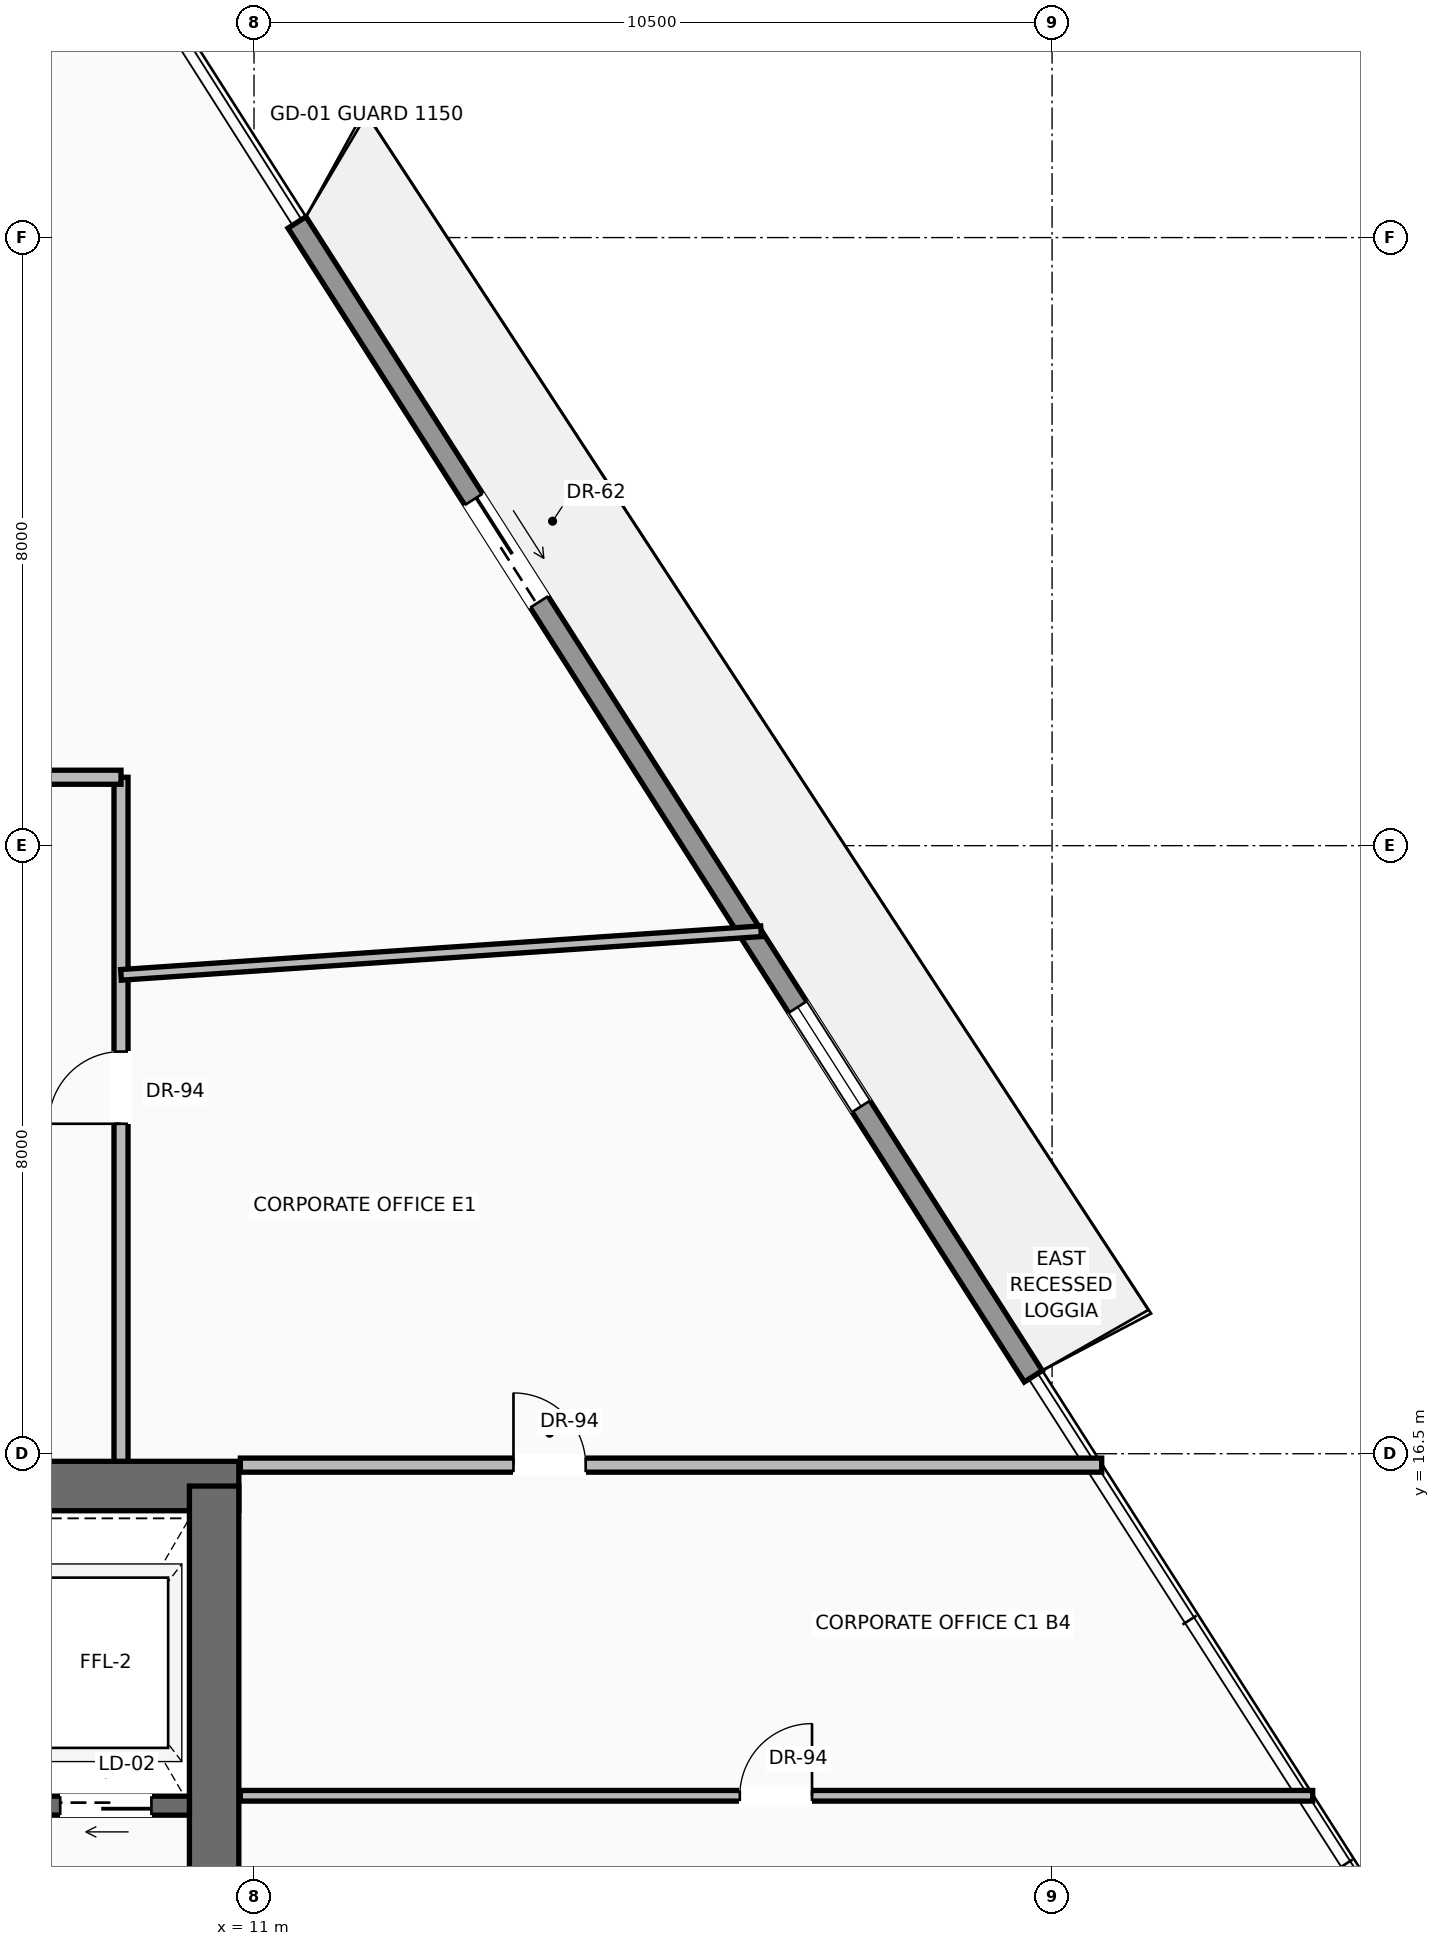
"""IFC4 building model, lengths in metres.
Left out: names, types, materials, properties, quantities, classifications, styles, units other than length and angle.
Written with IfcOpenShell. Run it as: python <this file> out.ifc"""

import sys

from ifc_helpers import new_model, si_unit, direction, frame, frame_2d, origin, place, context, subcontext, project, spatial, rectangle, extrude, source, transform, mapped, element, fill, save


model = new_model("IFC4")
c1 = context("Model", 3, precision=1e-05, world=origin(), true_north=direction((0.0, 1.0)))
c2 = subcontext(c1, "Body", "Model", "MODEL_VIEW")
j1 = project(units=[si_unit("LENGTHUNIT", "METRE"), si_unit("PLANEANGLEUNIT", "RADIAN")], contexts=[c1])
p1 = place(None, origin())
s1 = spatial("IfcSite", under=j1, at=p1, CompositionType="ELEMENT")
p2 = place(p1, origin())
s2 = spatial("IfcBuilding", under=s1, at=p2, CompositionType="ELEMENT")
p3 = place(p2, frame((0.0, 0.0, 133.0)))
s3 = spatial("IfcBuildingStorey", under=s2, at=p3, CompositionType="ELEMENT", Elevation=133.0)
p4 = place(p3, frame((-10.8, 16.075, 0.0), z_axis=(0.0, 0.0, 1.0), x_axis=(1.0, 0.0, 0.0)))
e1 = element("IfcWall", 1, at=p4, inside=s3, PredefinedType="SHEAR", context=c2, shape_type="SweptSolid", body=[
    extrude(rectangle(XDim=21.6, YDim=0.65, at=frame_2d((10.8, 0.0))), origin(), (0.0, 0.0, 1.0), 3.47),
])
p5 = place(p4, frame((3.37, 0.0, 0.0)))
e2 = element("IfcOpeningElement", 2, at=p5, cuts=e1, PredefinedType="OPENING", context=c2, shape_type="SweptSolid", body=[
    extrude(rectangle(XDim=1.3, YDim=2.3, at=frame_2d((0.65, 1.15))), frame((0.0, 0.335, 0.0), z_axis=(0.0, -1.0, 0.0), x_axis=(1.0, 0.0, 0.0)), (0.0, 0.0, 1.0), 0.67),
])
p6 = place(p4, frame((9.8, 0.0, 0.0)))
e3 = element("IfcOpeningElement", 3, at=p6, cuts=e1, PredefinedType="OPENING", context=c2, shape_type="SweptSolid", body=[
    extrude(rectangle(XDim=2.0, YDim=2.4, at=frame_2d((1.0, 1.2))), frame((0.0, 0.335, 0.0), z_axis=(0.0, -1.0, 0.0), x_axis=(1.0, 0.0, 0.0)), (0.0, 0.0, 1.0), 0.67),
])
p7 = place(p3, frame((10.475, 0.525, 0.0), z_axis=(0.0, 0.0, 1.0), x_axis=(0.0, 1.0, 0.0)))
e4 = element("IfcWall", 4, at=p7, inside=s3, PredefinedType="SHEAR", context=c2, shape_type="SweptSolid", body=[
    extrude(rectangle(XDim=15.55, YDim=0.65, at=frame_2d((7.775, 0.0))), origin(), (0.0, 0.0, 1.0), 3.47),
])
p8 = place(p3, frame((11.566, 32.699, 0.0), z_axis=(0.0, 0.0, 1.0), x_axis=(0.537954082698, -0.842974142491, 0.0)))
e5 = element("IfcWall", 5, at=p8, inside=s3, PredefinedType="SOLIDWALL", context=c2, shape_type="SweptSolid", body=[
    extrude(rectangle(XDim=18.008, YDim=0.28, at=frame_2d((9.004, 0.0))), origin(), (0.0, 0.0, 1.0), 3.05),
])
p9 = place(p8, frame((4.322, 0.0, 0.0)))
e6 = element("IfcOpeningElement", 6, at=p9, cuts=e5, PredefinedType="OPENING", context=c2, shape_type="SweptSolid", body=[
    extrude(rectangle(XDim=1.6, YDim=2.35, at=frame_2d((0.8, 1.175))), frame((0.0, 0.15, 0.0), z_axis=(0.0, -1.0, 0.0), x_axis=(1.0, 0.0, 0.0)), (0.0, 0.0, 1.0), 0.3),
])
p10 = place(p8, frame((12.245, 0.0, 0.9)))
e7 = element("IfcOpeningElement", 7, at=p10, cuts=e5, PredefinedType="OPENING", context=c2, shape_type="SweptSolid", body=[
    extrude(rectangle(XDim=1.55, YDim=1.85, at=frame_2d((0.775, 0.925))), frame((0.0, 0.15, 0.0), z_axis=(0.0, -1.0, 0.0), x_axis=(1.0, 0.0, 0.0)), (0.0, 0.0, 1.0), 0.3),
])
p11 = place(p3, frame((10.15, 11.87, 0.0), z_axis=(0.0, 0.0, 1.0), x_axis=(-1.0, 0.0, 0.0)))
e8 = element("IfcWall", 8, at=p11, inside=s3, PredefinedType="SOLIDWALL", context=c2, shape_type="SweptSolid", body=[
    extrude(rectangle(XDim=4.65, YDim=0.25, at=frame_2d((2.325, 0.0))), origin(), (0.0, 0.0, 1.0), 3.47),
])
p12 = place(p11, frame((0.5, 0.0, 0.0)))
e9 = element("IfcOpeningElement", 9, at=p12, cuts=e8, PredefinedType="OPENING", context=c2, shape_type="SweptSolid", body=[
    extrude(rectangle(XDim=1.2, YDim=2.25, at=frame_2d((0.6, 1.125))), frame((0.0, 0.135, 0.0), z_axis=(0.0, -1.0, 0.0), x_axis=(1.0, 0.0, 0.0)), (0.0, 0.0, 1.0), 0.27),
])
p13 = place(p3, frame((9.25, 16.4, 0.0), z_axis=(0.0, 0.0, 1.0), x_axis=(0.0, 1.0, 0.0)))
e10 = element("IfcWall", 10, at=p13, inside=s3, PredefinedType="PARTITIONING", context=c2, shape_type="SweptSolid", body=[
    extrude(rectangle(XDim=9.0, YDim=0.185, at=frame_2d((4.5, 0.0))), origin(), (0.0, 0.0, 1.0), 2.846),
])
p14 = place(p13, frame((4.441, 0.0, 0.0)))
e11 = element("IfcOpeningElement", 11, at=p14, cuts=e10, PredefinedType="OPENING", context=c2, shape_type="SweptSolid", body=[
    extrude(rectangle(XDim=0.95, YDim=2.2, at=frame_2d((0.475, 1.1))), frame((0.0, 0.103, 0.0), z_axis=(0.0, -1.0, 0.0), x_axis=(1.0, 0.0, 0.0)), (0.0, 0.0, 1.0), 0.205),
])
p15 = place(p3, frame((7.05, 25.4, 0.0), z_axis=(0.0, 0.0, 1.0), x_axis=(1.0, 0.0, 0.0)))
e12 = element("IfcWall", 12, at=p15, inside=s3, PredefinedType="PARTITIONING", context=c2, shape_type="SweptSolid", body=[
    extrude(rectangle(XDim=2.2, YDim=0.185, at=frame_2d((1.1, 0.0))), origin(), (0.0, 0.0, 1.0), 3.462),
])
p16 = place(p3, frame((10.82, 16.35, 0.0), z_axis=(0.0, 0.0, 1.0), x_axis=(1.0, 0.0, 0.0)))
e13 = element("IfcWall", 13, at=p16, inside=s3, PredefinedType="PARTITIONING", context=c2, shape_type="SweptSolid", body=[
    extrude(rectangle(XDim=11.333, YDim=0.185, at=frame_2d((5.667, 0.0))), origin(), (0.0, 0.0, 1.0), 3.462),
])
p17 = place(p16, frame((3.594, 0.0, 0.0)))
e14 = element("IfcOpeningElement", 14, at=p17, cuts=e13, PredefinedType="OPENING", context=c2, shape_type="SweptSolid", body=[
    extrude(rectangle(XDim=0.95, YDim=2.2, at=frame_2d((0.475, 1.1))), frame((0.0, 0.103, 0.0), z_axis=(0.0, -1.0, 0.0), x_axis=(1.0, 0.0, 0.0)), (0.0, 0.0, 1.0), 0.205),
])
p18 = place(p3, frame((10.82, 12.0, 0.0), z_axis=(0.0, 0.0, 1.0), x_axis=(1.0, 0.0, 0.0)))
e15 = element("IfcWall", 15, at=p18, inside=s3, PredefinedType="PARTITIONING", context=c2, shape_type="SweptSolid", body=[
    extrude(rectangle(XDim=14.109, YDim=0.14, at=frame_2d((7.055, 0.0))), origin(), (0.0, 0.0, 1.0), 3.462),
])
p19 = place(p18, frame((6.572, 0.0, 0.0)))
e16 = element("IfcOpeningElement", 16, at=p19, cuts=e15, PredefinedType="OPENING", context=c2, shape_type="SweptSolid", body=[
    extrude(rectangle(XDim=0.95, YDim=2.2, at=frame_2d((0.475, 1.1))), frame((0.0, 0.08, 0.0), z_axis=(0.0, -1.0, 0.0), x_axis=(1.0, 0.0, 0.0)), (0.0, 0.0, 1.0), 0.16),
])
p20 = place(p3, frame((9.25, 22.8, 0.0), z_axis=(0.0, 0.0, 1.0), x_axis=(0.997687082157, 0.067974157575, 0.0)))
e17 = element("IfcWall", 17, at=p20, inside=s3, PredefinedType="PARTITIONING", context=c2, shape_type="SweptSolid", body=[
    extrude(rectangle(XDim=8.44, YDim=0.14, at=frame_2d((4.22, 0.0))), origin(), (0.0, 0.0, 1.0), 3.462),
])
m1 = source(origin(), c2, "Body", "SweptSolid", [
    extrude(rectangle(XDim=1.6, YDim=2.35, at=frame_2d((0.8, 1.175))), frame((0.0, 0.025, 0.0), z_axis=(0.0, -1.0, 0.0), x_axis=(1.0, 0.0, 0.0)), (0.0, 0.0, 1.0), 0.05),
])
p21 = place(p9, origin())
e18 = element("IfcDoor", 18, at=p21, inside=s3, OperationType="SLIDING_TO_RIGHT", PredefinedType="DOOR", context=c2, shape_type="MappedRepresentation", body=[
    mapped(m1, transform((0.0, 0.0, 0.0), scale=1.0)),
])
fill(e6, e18)
m2 = source(origin(), c2, "Body", "SweptSolid", [
    extrude(rectangle(XDim=1.55, YDim=1.85, at=frame_2d((0.775, 0.925))), frame((0.0, 0.03, 0.0), z_axis=(0.0, -1.0, 0.0), x_axis=(1.0, 0.0, 0.0)), (0.0, 0.0, 1.0), 0.06),
])
p22 = place(p10, origin())
e19 = element("IfcWindow", 19, at=p22, inside=s3, PartitioningType="SINGLE_PANEL", PredefinedType="WINDOW", context=c2, shape_type="MappedRepresentation", body=[
    mapped(m2, transform((0.0, 0.0, 0.0), scale=1.0)),
])
fill(e7, e19)
m3 = source(origin(), c2, "Body", "SweptSolid", [
    extrude(rectangle(XDim=1.2, YDim=2.25, at=frame_2d((0.6, 1.125))), frame((0.0, 0.025, 0.0), z_axis=(0.0, -1.0, 0.0), x_axis=(1.0, 0.0, 0.0)), (0.0, 0.0, 1.0), 0.05),
])
p23 = place(p12, origin())
e20 = element("IfcDoor", 20, at=p23, inside=s3, OperationType="SLIDING_TO_RIGHT", PredefinedType="DOOR", context=c2, shape_type="MappedRepresentation", body=[
    mapped(m3, transform((0.0, 0.0, 0.0), scale=1.0)),
])
fill(e9, e20)
m4 = source(origin(), c2, "Body", "SweptSolid", [
    extrude(rectangle(XDim=0.95, YDim=2.2, at=frame_2d((0.475, 1.1))), frame((0.0, 0.025, 0.0), z_axis=(0.0, -1.0, 0.0), x_axis=(1.0, 0.0, 0.0)), (0.0, 0.0, 1.0), 0.05),
])
p24 = place(p14, origin())
e21 = element("IfcDoor", 21, at=p24, inside=s3, OperationType="SINGLE_SWING_LEFT", PredefinedType="DOOR", context=c2, shape_type="MappedRepresentation", body=[
    mapped(m4, transform((0.0, 0.0, 0.0), scale=1.0)),
])
fill(e11, e21)
p25 = place(p17, origin())
e22 = element("IfcDoor", 22, at=p25, inside=s3, OperationType="SINGLE_SWING_LEFT", PredefinedType="DOOR", context=c2, shape_type="MappedRepresentation", body=[
    mapped(m4, transform((0.0, 0.0, 0.0), scale=1.0)),
])
fill(e14, e22)
p26 = place(p19, origin())
e23 = element("IfcDoor", 23, at=p26, inside=s3, OperationType="SINGLE_SWING_RIGHT", PredefinedType="DOOR", context=c2, shape_type="MappedRepresentation", body=[
    mapped(m4, transform((0.0, 0.0, 0.0), scale=1.0)),
])
fill(e16, e23)
save(model, sys.argv[1])
